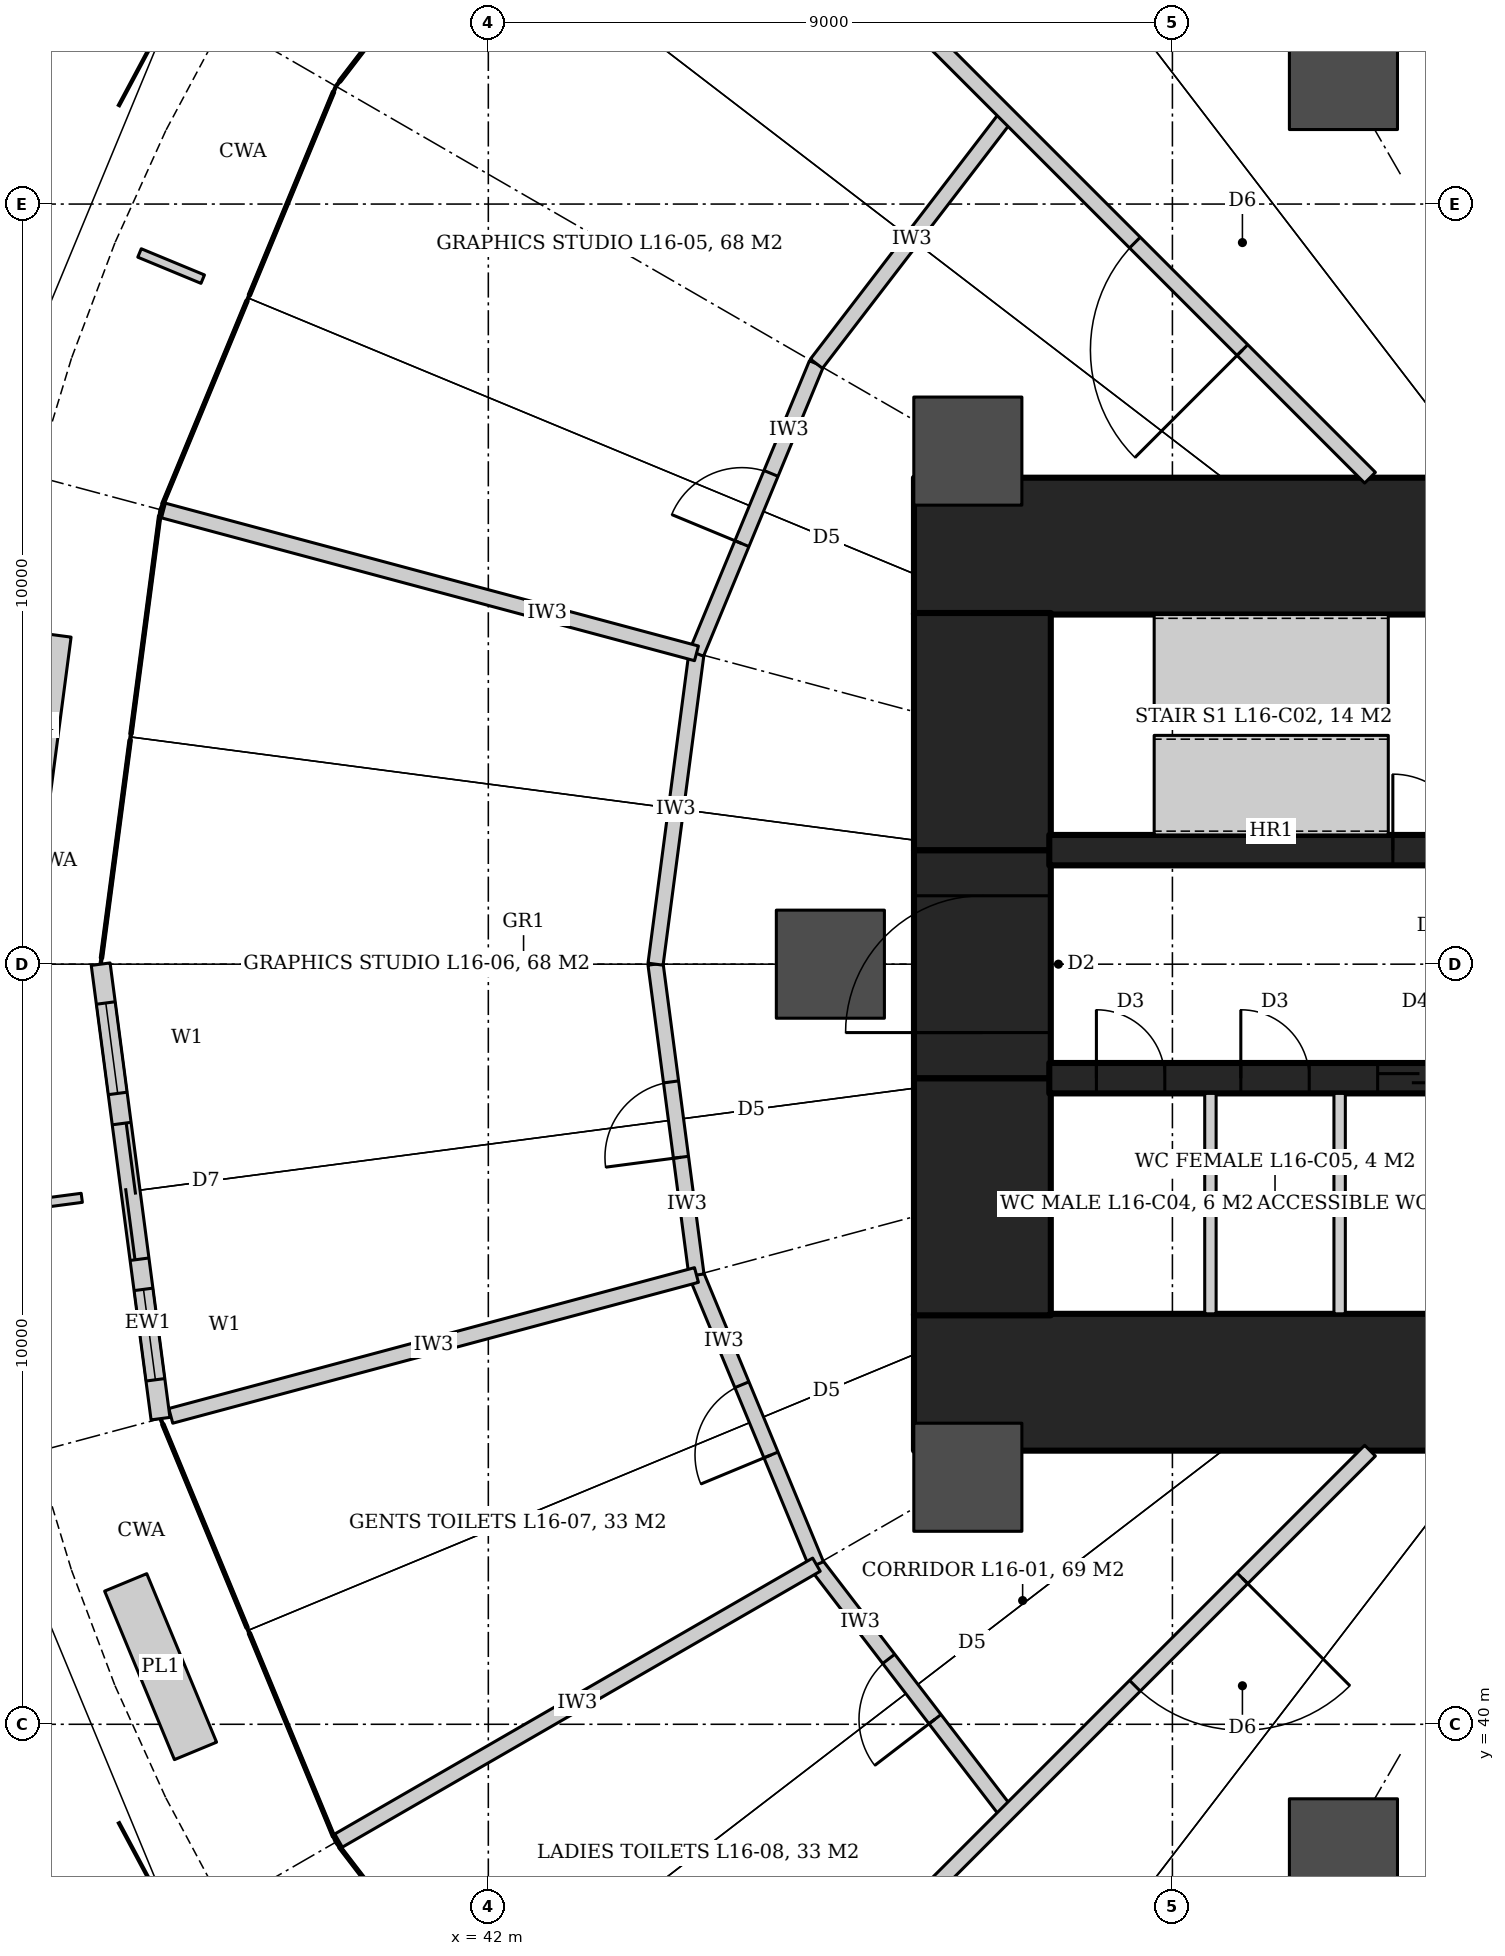
"""IFC4 building model, lengths in metres.
Left out: names, types, materials, properties, quantities, classifications, styles, units other than length and angle.
Written with IfcOpenShell. Run it as: python <this file> out.ifc"""

import sys

from ifc_helpers import new_model, si_unit, direction, frame, frame_2d, origin, origin_2d, place, context, subcontext, project, spatial, rectangle, hollow_circle, extrude, element, fill, save


model = new_model("IFC4")
c1 = context("Model", 3, precision=1e-05, world=origin(), true_north=direction((0.0, 1.0)))
c2 = subcontext(c1, "Body", "Model", "MODEL_VIEW")
j1 = project(units=[si_unit("LENGTHUNIT", "METRE"), si_unit("PLANEANGLEUNIT", "RADIAN")], contexts=[c1])
p1 = place(None, origin())
s1 = spatial("IfcSite", under=j1, at=p1, CompositionType="ELEMENT")
p2 = place(p1, origin())
s2 = spatial("IfcBuilding", under=s1, at=p2, CompositionType="ELEMENT")
p3 = place(p2, frame((0.0, 0.0, 68.0)))
s3 = spatial("IfcBuildingStorey", under=s2, at=p3, CompositionType="ELEMENT", Elevation=68.0)
for number, where, z_axis, x_axis in (
    (1, (47.6, 55.5, 0.0), (0.0, 0.0, 1.0), (1.0, 0.0, 0.0)),
    (2, (47.6, 44.5, 0.0), (0.0, 0.0, 1.0), (1.0, 0.0, 0.0)),
):
    element("IfcWall", number, at=place(p3, frame(where, z_axis=z_axis, x_axis=x_axis)), inside=s3, PredefinedType="SHEAR", context=c2, shape_type="SweptSolid", body=[
        extrude(rectangle(XDim=7.8, YDim=1.8, at=frame_2d((3.9, 0.0))), origin(), (0.0, 0.0, 1.0), 4.2),
    ])
p4 = place(p3, frame((48.5, 45.38, 0.0), z_axis=(0.0, 0.0, 1.0), x_axis=(0.0, 1.0, 0.0)))
e3 = element("IfcWall", 3, at=p4, inside=s3, PredefinedType="SHEAR", context=c2, shape_type="SweptSolid", body=[
    extrude(rectangle(XDim=3.12, YDim=1.8, at=frame_2d((1.56, 0.0))), origin(), (0.0, 0.0, 1.0), 4.2),
])
p5 = place(p3, frame((48.5, 48.5, 0.0), z_axis=(0.0, 0.0, 1.0), x_axis=(0.0, 1.0, 0.0)))
e4 = element("IfcWall", 4, at=p5, inside=s3, PredefinedType="SHEAR", context=c2, shape_type="SweptSolid", body=[
    extrude(rectangle(XDim=3.0, YDim=1.8, at=frame_2d((1.5, 0.0))), origin(), (0.0, 0.0, 1.0), 4.2),
])
p6 = place(p5, frame((0.6, 0.0, 0.0)))
e5 = element("IfcOpeningElement", 5, at=p6, cuts=e4, PredefinedType="OPENING", context=c2, shape_type="SweptSolid", body=[
    extrude(rectangle(XDim=1.8, YDim=2.1, at=frame_2d((0.9, 1.05))), frame((0.0, 0.91, 0.0), z_axis=(0.0, -1.0, 0.0), x_axis=(1.0, 0.0, 0.0)), (0.0, 0.0, 1.0), 1.82),
])
p7 = place(p3, frame((48.5, 51.5, 0.0), z_axis=(0.0, 0.0, 1.0), x_axis=(0.0, 1.0, 0.0)))
e6 = element("IfcWall", 6, at=p7, inside=s3, PredefinedType="SHEAR", context=c2, shape_type="SweptSolid", body=[
    extrude(rectangle(XDim=3.12, YDim=1.8, at=frame_2d((1.56, 0.0))), origin(), (0.0, 0.0, 1.0), 4.2),
])
p8 = place(p3, frame((49.38, 51.5, 0.0), z_axis=(0.0, 0.0, 1.0), x_axis=(1.0, 0.0, 0.0)))
e7 = element("IfcWall", 7, at=p8, inside=s3, PredefinedType="SHEAR", context=c2, shape_type="SweptSolid", body=[
    extrude(rectangle(XDim=6.02, YDim=0.4, at=frame_2d((3.01, 0.0))), origin(), (0.0, 0.0, 1.0), 4.2),
])
p9 = place(p8, frame((4.52, 0.0, 0.0)))
e8 = element("IfcOpeningElement", 8, at=p9, cuts=e7, PredefinedType="OPENING", context=c2, shape_type="SweptSolid", body=[
    extrude(rectangle(XDim=1.0, YDim=2.1, at=frame_2d((0.5, 1.05))), frame((0.0, 0.21, 0.0), z_axis=(0.0, -1.0, 0.0), x_axis=(1.0, 0.0, 0.0)), (0.0, 0.0, 1.0), 0.42),
])
p10 = place(p3, frame((49.38, 48.5, 0.0), z_axis=(0.0, 0.0, 1.0), x_axis=(1.0, 0.0, 0.0)))
e9 = element("IfcWall", 9, at=p10, inside=s3, PredefinedType="SHEAR", context=c2, shape_type="SweptSolid", body=[
    extrude(rectangle(XDim=6.02, YDim=0.4, at=frame_2d((3.01, 0.0))), origin(), (0.0, 0.0, 1.0), 4.2),
])
p11 = place(p10, frame((0.62, 0.0, 0.0)))
e10 = element("IfcOpeningElement", 10, at=p11, cuts=e9, PredefinedType="OPENING", context=c2, shape_type="SweptSolid", body=[
    extrude(rectangle(XDim=0.9, YDim=2.1, at=frame_2d((0.45, 1.05))), frame((0.0, 0.21, 0.0), z_axis=(0.0, -1.0, 0.0), x_axis=(1.0, 0.0, 0.0)), (0.0, 0.0, 1.0), 0.42),
])
p12 = place(p10, frame((2.52, 0.0, 0.0)))
e11 = element("IfcOpeningElement", 11, at=p12, cuts=e9, PredefinedType="OPENING", context=c2, shape_type="SweptSolid", body=[
    extrude(rectangle(XDim=0.9, YDim=2.1, at=frame_2d((0.45, 1.05))), frame((0.0, 0.21, 0.0), z_axis=(0.0, -1.0, 0.0), x_axis=(1.0, 0.0, 0.0)), (0.0, 0.0, 1.0), 0.42),
])
p13 = place(p10, frame((4.32, 0.0, 0.0)))
e12 = element("IfcOpeningElement", 12, at=p13, cuts=e9, PredefinedType="OPENING", context=c2, shape_type="SweptSolid", body=[
    extrude(rectangle(XDim=1.0, YDim=2.1, at=frame_2d((0.5, 1.05))), frame((0.0, 0.21, 0.0), z_axis=(0.0, -1.0, 0.0), x_axis=(1.0, 0.0, 0.0)), (0.0, 0.0, 1.0), 0.42),
])
for number, where, z_axis, x_axis in (
    (13, (53.25, 61.691, 0.0), (0.0, 0.0, 1.0), (1.0, 0.0, 0.0)),
    (14, (48.309, 56.75, 0.0), (0.0, 0.0, 1.0), (1.0, 0.0, 0.0)),
    (15, (46.5, 50.0, 0.0), (0.0, 0.0, 1.0), (1.0, 0.0, 0.0)),
    (16, (48.309, 43.25, 0.0), (0.0, 0.0, 1.0), (1.0, 0.0, 0.0)),
    (17, (53.25, 38.309, 0.0), (0.0, 0.0, 1.0), (1.0, 0.0, 0.0)),
):
    element("IfcColumn", number, at=place(p3, frame(where, z_axis=z_axis, x_axis=x_axis)), inside=s3, PredefinedType="COLUMN", context=c2, shape_type="SweptSolid", body=[
        extrude(hollow_circle(Radius=0.711, WallThickness=0.07, at=origin_2d()), origin(), (0.0, 0.0, 1.0), 4.2),
    ])
p14 = place(p3, frame((48.828, 38.828, 0.0), z_axis=(0.0, 0.0, 1.0), x_axis=(-0.608714823874, 0.793389099494, 0.0)))
e18 = element("IfcWall", 18, at=p14, inside=s3, PredefinedType="PARTITIONING", context=c2, shape_type="SweptSolid", body=[
    extrude(rectangle(XDim=4.125, YDim=0.2, at=frame_2d((2.062, 0.0))), origin(), (0.0, 0.0, 1.0), 3.04),
])
p15 = place(p14, frame((1.562, 0.0, 0.0)))
e19 = element("IfcOpeningElement", 19, at=p15, cuts=e18, PredefinedType="OPENING", context=c2, shape_type="SweptSolid", body=[
    extrude(rectangle(XDim=1.0, YDim=2.1, at=frame_2d((0.5, 1.05))), frame((0.0, 0.11, 0.0), z_axis=(0.0, -1.0, 0.0), x_axis=(1.0, 0.0, 0.0)), (0.0, 0.0, 1.0), 0.22),
])
p16 = place(p3, frame((46.317, 42.1, 0.0), z_axis=(0.0, 0.0, 1.0), x_axis=(-0.382731667114, 0.923859551549, 0.0)))
e20 = element("IfcWall", 20, at=p16, inside=s3, PredefinedType="PARTITIONING", context=c2, shape_type="SweptSolid", body=[
    extrude(rectangle(XDim=4.125, YDim=0.2, at=frame_2d((2.062, 0.0))), origin(), (0.0, 0.0, 1.0), 3.04),
])
p17 = place(p16, frame((1.562, 0.0, 0.0)))
e21 = element("IfcOpeningElement", 21, at=p17, cuts=e20, PredefinedType="OPENING", context=c2, shape_type="SweptSolid", body=[
    extrude(rectangle(XDim=1.0, YDim=2.1, at=frame_2d((0.5, 1.05))), frame((0.0, 0.11, 0.0), z_axis=(0.0, -1.0, 0.0), x_axis=(1.0, 0.0, 0.0)), (0.0, 0.0, 1.0), 0.22),
])
p18 = place(p3, frame((44.738, 45.911, 0.0), z_axis=(0.0, 0.0, 1.0), x_axis=(-0.130515758099, 0.991446234996, 0.0)))
e22 = element("IfcWall", 22, at=p18, inside=s3, PredefinedType="PARTITIONING", context=c2, shape_type="SweptSolid", body=[
    extrude(rectangle(XDim=4.125, YDim=0.2, at=frame_2d((2.062, 0.0))), origin(), (0.0, 0.0, 1.0), 3.04),
])
p19 = place(p18, frame((1.562, 0.0, 0.0)))
e23 = element("IfcOpeningElement", 23, at=p19, cuts=e22, PredefinedType="OPENING", context=c2, shape_type="SweptSolid", body=[
    extrude(rectangle(XDim=1.0, YDim=2.1, at=frame_2d((0.5, 1.05))), frame((0.0, 0.11, 0.0), z_axis=(0.0, -1.0, 0.0), x_axis=(1.0, 0.0, 0.0)), (0.0, 0.0, 1.0), 0.22),
])
p20 = place(p3, frame((44.2, 50.0, 0.0), z_axis=(0.0, 0.0, 1.0), x_axis=(0.130515758099, 0.991446234996, 0.0)))
e24 = element("IfcWall", 24, at=p20, inside=s3, PredefinedType="PARTITIONING", context=c2, shape_type="SweptSolid", body=[
    extrude(rectangle(XDim=4.125, YDim=0.2, at=frame_2d((2.062, 0.0))), origin(), (0.0, 0.0, 1.0), 3.04),
])
p21 = place(p3, frame((44.738, 54.089, 0.0), z_axis=(0.0, 0.0, 1.0), x_axis=(0.382731667114, 0.923859551549, 0.0)))
e25 = element("IfcWall", 25, at=p21, inside=s3, PredefinedType="PARTITIONING", context=c2, shape_type="SweptSolid", body=[
    extrude(rectangle(XDim=4.125, YDim=0.2, at=frame_2d((2.062, 0.0))), origin(), (0.0, 0.0, 1.0), 3.04),
])
p22 = place(p21, frame((1.562, 0.0, 0.0)))
e26 = element("IfcOpeningElement", 26, at=p22, cuts=e25, PredefinedType="OPENING", context=c2, shape_type="SweptSolid", body=[
    extrude(rectangle(XDim=1.0, YDim=2.1, at=frame_2d((0.5, 1.05))), frame((0.0, 0.11, 0.0), z_axis=(0.0, -1.0, 0.0), x_axis=(1.0, 0.0, 0.0)), (0.0, 0.0, 1.0), 0.22),
])
p23 = place(p3, frame((46.317, 57.9, 0.0), z_axis=(0.0, 0.0, 1.0), x_axis=(0.608714823874, 0.793389099494, 0.0)))
e27 = element("IfcWall", 27, at=p23, inside=s3, PredefinedType="PARTITIONING", context=c2, shape_type="SweptSolid", body=[
    extrude(rectangle(XDim=4.125, YDim=0.2, at=frame_2d((2.062, 0.0))), origin(), (0.0, 0.0, 1.0), 3.04),
])
p24 = place(p3, frame((53.6, 56.4, 0.0), z_axis=(0.0, 0.0, 1.0), x_axis=(-0.707106781187, 0.707106781187, 0.0)))
e28 = element("IfcWall", 28, at=p24, inside=s3, PredefinedType="PARTITIONING", context=c2, shape_type="SweptSolid", body=[
    extrude(rectangle(XDim=13.909, YDim=0.2, at=frame_2d((6.955, 0.0))), origin(), (0.0, 0.0, 1.0), 3.02),
])
p25 = place(p24, frame((2.375, 0.0, 0.0)))
e29 = element("IfcOpeningElement", 29, at=p25, cuts=e28, PredefinedType="OPENING", context=c2, shape_type="SweptSolid", body=[
    extrude(rectangle(XDim=2.0, YDim=2.1, at=frame_2d((1.0, 1.05))), frame((0.0, 0.11, 0.0), z_axis=(0.0, -1.0, 0.0), x_axis=(1.0, 0.0, 0.0)), (0.0, 0.0, 1.0), 0.22),
])
p26 = place(p3, frame((44.738, 54.089, 0.0), z_axis=(0.0, 0.0, 1.0), x_axis=(-0.965929787715, 0.258804260405, 0.0)))
e30 = element("IfcWall", 30, at=p26, inside=s3, PredefinedType="PARTITIONING", context=c2, shape_type="SweptSolid", body=[
    extrude(rectangle(XDim=7.16, YDim=0.2, at=frame_2d((3.58, 0.0))), origin(), (0.0, 0.0, 1.0), 3.04),
])
p27 = place(p3, frame((44.738, 45.911, 0.0), z_axis=(0.0, 0.0, 1.0), x_axis=(-0.965928911257, -0.258807531571, 0.0)))
e31 = element("IfcWall", 31, at=p27, inside=s3, PredefinedType="PARTITIONING", context=c2, shape_type="SweptSolid", body=[
    extrude(rectangle(XDim=7.06, YDim=0.2, at=frame_2d((3.53, 0.0))), origin(), (0.0, 0.0, 1.0), 3.04),
])
p28 = place(p3, frame((46.317, 42.1, 0.0), z_axis=(0.0, 0.0, 1.0), x_axis=(-0.866018643436, -0.500011709085, 0.0)))
e32 = element("IfcWall", 32, at=p28, inside=s3, PredefinedType="PARTITIONING", context=c2, shape_type="SweptSolid", body=[
    extrude(rectangle(XDim=7.16, YDim=0.2, at=frame_2d((3.58, 0.0))), origin(), (0.0, 0.0, 1.0), 3.04),
])
p29 = place(p3, frame((53.6, 43.6, 0.0), z_axis=(0.0, 0.0, 1.0), x_axis=(-0.707106781187, -0.707106781187, 0.0)))
e33 = element("IfcWall", 33, at=p29, inside=s3, PredefinedType="PARTITIONING", context=c2, shape_type="SweptSolid", body=[
    extrude(rectangle(XDim=13.909, YDim=0.2, at=frame_2d((6.955, 0.0))), origin(), (0.0, 0.0, 1.0), 3.02),
])
p30 = place(p29, frame((2.375, 0.0, 0.0)))
e34 = element("IfcOpeningElement", 34, at=p30, cuts=e33, PredefinedType="OPENING", context=c2, shape_type="SweptSolid", body=[
    extrude(rectangle(XDim=2.0, YDim=2.1, at=frame_2d((1.0, 1.05))), frame((0.0, 0.11, 0.0), z_axis=(0.0, -1.0, 0.0), x_axis=(1.0, 0.0, 0.0)), (0.0, 0.0, 1.0), 0.22),
])
p31 = place(p3, frame((37.0, 50.0, 0.0), z_axis=(0.0, 0.0, 1.0), x_axis=(0.130522880875, -0.991445297315, 0.0)))
e35 = element("IfcWall", 35, at=p31, inside=s3, PredefinedType="SOLIDWALL", context=c2, shape_type="SweptSolid", body=[
    extrude(rectangle(XDim=6.004, YDim=0.25, at=frame_2d((3.002, 0.0))), origin(), (0.0, 0.0, 1.0), 4.04),
])
p32 = place(p31, frame((2.102, 0.0, 0.0)))
e36 = element("IfcOpeningElement", 36, at=p32, cuts=e35, PredefinedType="OPENING", context=c2, shape_type="SweptSolid", body=[
    extrude(rectangle(XDim=1.8, YDim=2.4, at=frame_2d((0.9, 1.2))), frame((0.0, 0.135, 0.0), z_axis=(0.0, -1.0, 0.0), x_axis=(1.0, 0.0, 0.0)), (0.0, 0.0, 1.0), 0.27),
])
p33 = place(p31, frame((0.502, 0.0, 0.0)))
e37 = element("IfcOpeningElement", 37, at=p33, cuts=e35, PredefinedType="OPENING", context=c2, shape_type="SweptSolid", body=[
    extrude(rectangle(XDim=1.2, YDim=2.4, at=frame_2d((0.6, 1.2))), frame((0.0, 0.135, 0.0), z_axis=(0.0, -1.0, 0.0), x_axis=(1.0, 0.0, 0.0)), (0.0, 0.0, 1.0), 0.27),
])
p34 = place(p31, frame((4.302, 0.0, 0.0)))
e38 = element("IfcOpeningElement", 38, at=p34, cuts=e35, PredefinedType="OPENING", context=c2, shape_type="SweptSolid", body=[
    extrude(rectangle(XDim=1.2, YDim=2.4, at=frame_2d((0.6, 1.2))), frame((0.0, 0.135, 0.0), z_axis=(0.0, -1.0, 0.0), x_axis=(1.0, 0.0, 0.0)), (0.0, 0.0, 1.0), 0.27),
])
for number, where, z_axis, x_axis in (
    (39, (51.5, 45.4, 0.0), (0.0, 0.0, 1.0), (0.0, 1.0, 0.0)),
    (40, (53.2, 45.4, 0.0), (0.0, 0.0, 1.0), (0.0, 1.0, 0.0)),
):
    element("IfcWall", number, at=place(p3, frame(where, z_axis=z_axis, x_axis=x_axis)), inside=s3, PredefinedType="PARTITIONING", context=c2, shape_type="SweptSolid", body=[
        extrude(rectangle(XDim=2.9, YDim=0.15, at=frame_2d((1.45, 0.0))), origin(), (0.0, 0.0, 1.0), 4.04),
    ])
p35 = place(p25, origin())
e41 = element("IfcDoor", 41, at=p35, inside=s3, OperationType="DOUBLE_DOOR_DOUBLE_SWING", PredefinedType="DOOR", context=c2, shape_type="SweptSolid", body=[
    extrude(rectangle(XDim=2.0, YDim=2.1, at=frame_2d((1.0, 1.05))), frame((0.0, 0.025, 0.0), z_axis=(0.0, -1.0, 0.0), x_axis=(1.0, 0.0, 0.0)), (0.0, 0.0, 1.0), 0.05),
])
fill(e29, e41)
p36 = place(p22, origin())
e42 = element("IfcDoor", 42, at=p36, inside=s3, OperationType="SINGLE_SWING_LEFT", PredefinedType="DOOR", context=c2, shape_type="SweptSolid", body=[
    extrude(rectangle(XDim=1.0, YDim=2.1, at=frame_2d((0.5, 1.05))), frame((0.0, 0.025, 0.0), z_axis=(0.0, -1.0, 0.0), x_axis=(1.0, 0.0, 0.0)), (0.0, 0.0, 1.0), 0.05),
])
fill(e26, e42)
p37 = place(p19, origin())
e43 = element("IfcDoor", 43, at=p37, inside=s3, OperationType="SINGLE_SWING_LEFT", PredefinedType="DOOR", context=c2, shape_type="SweptSolid", body=[
    extrude(rectangle(XDim=1.0, YDim=2.1, at=frame_2d((0.5, 1.05))), frame((0.0, 0.025, 0.0), z_axis=(0.0, -1.0, 0.0), x_axis=(1.0, 0.0, 0.0)), (0.0, 0.0, 1.0), 0.05),
])
fill(e23, e43)
p38 = place(p17, origin())
e44 = element("IfcDoor", 44, at=p38, inside=s3, OperationType="SINGLE_SWING_LEFT", PredefinedType="DOOR", context=c2, shape_type="SweptSolid", body=[
    extrude(rectangle(XDim=1.0, YDim=2.1, at=frame_2d((0.5, 1.05))), frame((0.0, 0.025, 0.0), z_axis=(0.0, -1.0, 0.0), x_axis=(1.0, 0.0, 0.0)), (0.0, 0.0, 1.0), 0.05),
])
fill(e21, e44)
p39 = place(p15, origin())
e45 = element("IfcDoor", 45, at=p39, inside=s3, OperationType="SINGLE_SWING_LEFT", PredefinedType="DOOR", context=c2, shape_type="SweptSolid", body=[
    extrude(rectangle(XDim=1.0, YDim=2.1, at=frame_2d((0.5, 1.05))), frame((0.0, 0.025, 0.0), z_axis=(0.0, -1.0, 0.0), x_axis=(1.0, 0.0, 0.0)), (0.0, 0.0, 1.0), 0.05),
])
fill(e19, e45)
p40 = place(p30, origin())
e46 = element("IfcDoor", 46, at=p40, inside=s3, OperationType="DOUBLE_DOOR_DOUBLE_SWING", PredefinedType="DOOR", context=c2, shape_type="SweptSolid", body=[
    extrude(rectangle(XDim=2.0, YDim=2.1, at=frame_2d((1.0, 1.05))), frame((0.0, 0.025, 0.0), z_axis=(0.0, -1.0, 0.0), x_axis=(1.0, 0.0, 0.0)), (0.0, 0.0, 1.0), 0.05),
])
fill(e34, e46)
p41 = place(p32, origin())
e47 = element("IfcDoor", 47, at=p41, inside=s3, OperationType="DOUBLE_DOOR_SLIDING", PredefinedType="DOOR", context=c2, shape_type="SweptSolid", body=[
    extrude(rectangle(XDim=1.8, YDim=2.4, at=frame_2d((0.9, 1.2))), frame((0.0, 0.025, 0.0), z_axis=(0.0, -1.0, 0.0), x_axis=(1.0, 0.0, 0.0)), (0.0, 0.0, 1.0), 0.05),
])
fill(e36, e47)
p42 = place(p33, origin())
e48 = element("IfcWindow", 48, at=p42, inside=s3, PartitioningType="SINGLE_PANEL", PredefinedType="WINDOW", context=c2, shape_type="SweptSolid", body=[
    extrude(rectangle(XDim=1.2, YDim=2.4, at=frame_2d((0.6, 1.2))), frame((0.0, 0.03, 0.0), z_axis=(0.0, -1.0, 0.0), x_axis=(1.0, 0.0, 0.0)), (0.0, 0.0, 1.0), 0.06),
])
fill(e37, e48)
p43 = place(p34, origin())
e49 = element("IfcWindow", 49, at=p43, inside=s3, PartitioningType="SINGLE_PANEL", PredefinedType="WINDOW", context=c2, shape_type="SweptSolid", body=[
    extrude(rectangle(XDim=1.2, YDim=2.4, at=frame_2d((0.6, 1.2))), frame((0.0, 0.03, 0.0), z_axis=(0.0, -1.0, 0.0), x_axis=(1.0, 0.0, 0.0)), (0.0, 0.0, 1.0), 0.06),
])
fill(e38, e49)
p44 = place(p9, origin())
e50 = element("IfcDoor", 50, at=p44, inside=s3, OperationType="SINGLE_SWING_LEFT", PredefinedType="DOOR", context=c2, shape_type="SweptSolid", body=[
    extrude(rectangle(XDim=1.0, YDim=2.1, at=frame_2d((0.5, 1.05))), frame((0.0, 0.025, 0.0), z_axis=(0.0, -1.0, 0.0), x_axis=(1.0, 0.0, 0.0)), (0.0, 0.0, 1.0), 0.05),
])
fill(e8, e50)
p45 = place(p11, origin())
e51 = element("IfcDoor", 51, at=p45, inside=s3, OperationType="SINGLE_SWING_RIGHT", PredefinedType="DOOR", context=c2, shape_type="SweptSolid", body=[
    extrude(rectangle(XDim=0.9, YDim=2.1, at=frame_2d((0.45, 1.05))), frame((0.0, 0.025, 0.0), z_axis=(0.0, -1.0, 0.0), x_axis=(1.0, 0.0, 0.0)), (0.0, 0.0, 1.0), 0.05),
])
fill(e10, e51)
p46 = place(p12, origin())
e52 = element("IfcDoor", 52, at=p46, inside=s3, OperationType="SINGLE_SWING_RIGHT", PredefinedType="DOOR", context=c2, shape_type="SweptSolid", body=[
    extrude(rectangle(XDim=0.9, YDim=2.1, at=frame_2d((0.45, 1.05))), frame((0.0, 0.025, 0.0), z_axis=(0.0, -1.0, 0.0), x_axis=(1.0, 0.0, 0.0)), (0.0, 0.0, 1.0), 0.05),
])
fill(e11, e52)
p47 = place(p13, origin())
e53 = element("IfcDoor", 53, at=p47, inside=s3, OperationType="SLIDING_TO_LEFT", PredefinedType="DOOR", context=c2, shape_type="SweptSolid", body=[
    extrude(rectangle(XDim=1.0, YDim=2.1, at=frame_2d((0.5, 1.05))), frame((0.0, 0.025, 0.0), z_axis=(0.0, -1.0, 0.0), x_axis=(1.0, 0.0, 0.0)), (0.0, 0.0, 1.0), 0.05),
])
fill(e12, e53)
p48 = place(p6, origin())
e54 = element("IfcDoor", 54, at=p48, inside=s3, OperationType="DOUBLE_DOOR_DOUBLE_SWING", PredefinedType="DOOR", context=c2, shape_type="SweptSolid", body=[
    extrude(rectangle(XDim=1.8, YDim=2.1, at=frame_2d((0.9, 1.05))), frame((0.0, 0.025, 0.0), z_axis=(0.0, -1.0, 0.0), x_axis=(1.0, 0.0, 0.0)), (0.0, 0.0, 1.0), 0.05),
])
fill(e5, e54)
save(model, sys.argv[1])
